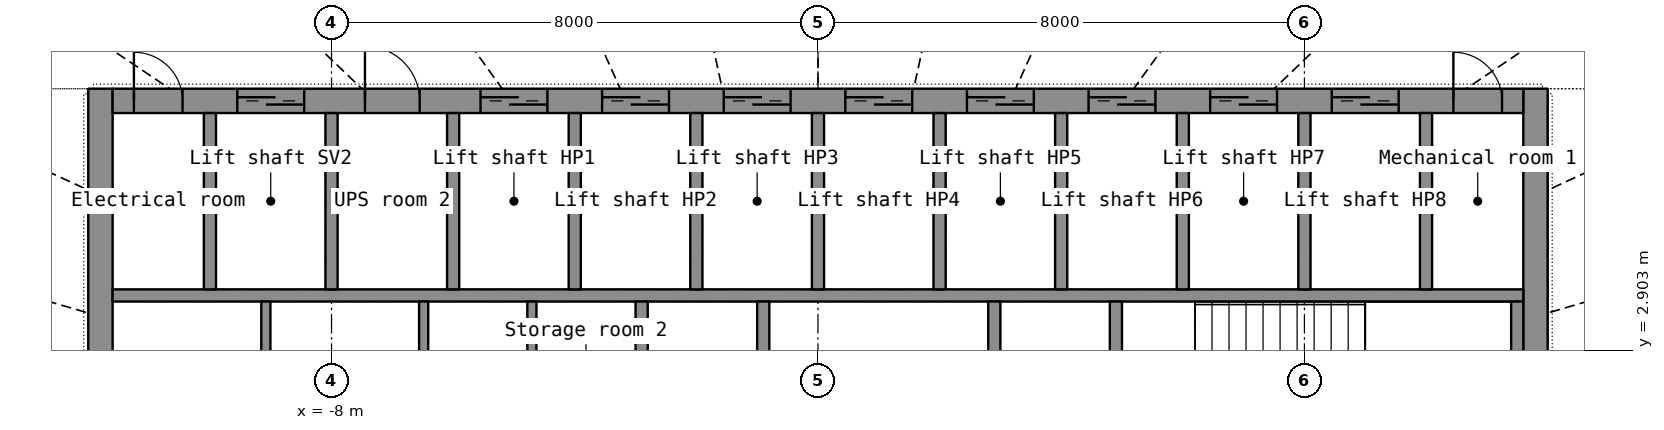
"""IFC4 building model, lengths in metres.
Left out: names, types, materials, properties, quantities, classifications, styles, units other than length and angle.
Written with IfcOpenShell. Run it as: python <this file> out.ifc"""

import sys

from ifc_helpers import new_model, si_unit, direction, frame, frame_2d, origin, place, context, subcontext, project, spatial, rectangle, extrude, element, fill, save


model = new_model("IFC4")
c1 = context("Model", 3, precision=1e-05, world=origin(), true_north=direction((0.0, 1.0)))
c2 = subcontext(c1, "Body", "Model", "MODEL_VIEW")
j1 = project(units=[si_unit("LENGTHUNIT", "METRE"), si_unit("PLANEANGLEUNIT", "RADIAN")], contexts=[c1])
p1 = place(None, origin())
s1 = spatial("IfcSite", under=j1, at=p1, CompositionType="ELEMENT")
p2 = place(p1, origin())
s2 = spatial("IfcBuilding", under=s1, at=p2, CompositionType="ELEMENT")
p3 = place(p2, frame((0.0, 0.0, 239.3)))
s3 = spatial("IfcBuildingStorey", under=s2, at=p3, CompositionType="ELEMENT", Elevation=239.3)
p4 = place(p3, frame((-11.8, -7.2, 0.0), z_axis=(0.0, 0.0, 1.0), x_axis=(0.0, 1.0, 0.0)))
e1 = element("IfcWall", 1, at=p4, inside=s3, PredefinedType="SHEAR", context=c2, shape_type="SweptSolid", body=[
    extrude(rectangle(XDim=14.4, YDim=0.4, at=frame_2d((7.2, 0.0))), origin(), (0.0, 0.0, 1.0), 3.3),
])
p5 = place(p4, frame((6.5, 0.0, 0.0)))
e2 = element("IfcOpeningElement", 2, at=p5, cuts=e1, PredefinedType="OPENING", context=c2, shape_type="SweptSolid", body=[
    extrude(rectangle(XDim=1.4, YDim=2.2, at=frame_2d((0.7, 1.1))), frame((0.0, 0.21, 0.0), z_axis=(0.0, -1.0, 0.0), x_axis=(1.0, 0.0, 0.0)), (0.0, 0.0, 1.0), 0.42),
])
p6 = place(p3, frame((11.8, -7.2, 0.0), z_axis=(0.0, 0.0, 1.0), x_axis=(0.0, 1.0, 0.0)))
e3 = element("IfcWall", 3, at=p6, inside=s3, PredefinedType="SHEAR", context=c2, shape_type="SweptSolid", body=[
    extrude(rectangle(XDim=14.4, YDim=0.4, at=frame_2d((7.2, 0.0))), origin(), (0.0, 0.0, 1.0), 3.3),
])
p7 = place(p6, frame((6.5, 0.0, 0.0)))
e4 = element("IfcOpeningElement", 4, at=p7, cuts=e3, PredefinedType="OPENING", context=c2, shape_type="SweptSolid", body=[
    extrude(rectangle(XDim=1.4, YDim=2.2, at=frame_2d((0.7, 1.1))), frame((0.0, 0.21, 0.0), z_axis=(0.0, -1.0, 0.0), x_axis=(1.0, 0.0, 0.0)), (0.0, 0.0, 1.0), 0.42),
])
p8 = place(p3, frame((-11.6, 7.0, 0.0), z_axis=(0.0, 0.0, 1.0), x_axis=(1.0, 0.0, 0.0)))
e5 = element("IfcWall", 5, at=p8, inside=s3, PredefinedType="SHEAR", context=c2, shape_type="SweptSolid", body=[
    extrude(rectangle(XDim=23.2, YDim=0.4, at=frame_2d((11.6, 0.0))), origin(), (0.0, 0.0, 1.0), 3.3),
])
p9 = place(p8, frame((2.05, 0.0, 0.0)))
e6 = element("IfcOpeningElement", 6, at=p9, cuts=e5, PredefinedType="OPENING", context=c2, shape_type="SweptSolid", body=[
    extrude(rectangle(XDim=1.1, YDim=2.2, at=frame_2d((0.55, 1.1))), frame((0.0, 0.21, 0.0), z_axis=(0.0, -1.0, 0.0), x_axis=(1.0, 0.0, 0.0)), (0.0, 0.0, 1.0), 0.42),
])
p10 = place(p8, frame((6.05, 0.0, 0.0)))
e7 = element("IfcOpeningElement", 7, at=p10, cuts=e5, PredefinedType="OPENING", context=c2, shape_type="SweptSolid", body=[
    extrude(rectangle(XDim=1.1, YDim=2.2, at=frame_2d((0.55, 1.1))), frame((0.0, 0.21, 0.0), z_axis=(0.0, -1.0, 0.0), x_axis=(1.0, 0.0, 0.0)), (0.0, 0.0, 1.0), 0.42),
])
p11 = place(p8, frame((8.05, 0.0, 0.0)))
e8 = element("IfcOpeningElement", 8, at=p11, cuts=e5, PredefinedType="OPENING", context=c2, shape_type="SweptSolid", body=[
    extrude(rectangle(XDim=1.1, YDim=2.2, at=frame_2d((0.55, 1.1))), frame((0.0, 0.21, 0.0), z_axis=(0.0, -1.0, 0.0), x_axis=(1.0, 0.0, 0.0)), (0.0, 0.0, 1.0), 0.42),
])
p12 = place(p8, frame((10.05, 0.0, 0.0)))
e9 = element("IfcOpeningElement", 9, at=p12, cuts=e5, PredefinedType="OPENING", context=c2, shape_type="SweptSolid", body=[
    extrude(rectangle(XDim=1.1, YDim=2.2, at=frame_2d((0.55, 1.1))), frame((0.0, 0.21, 0.0), z_axis=(0.0, -1.0, 0.0), x_axis=(1.0, 0.0, 0.0)), (0.0, 0.0, 1.0), 0.42),
])
p13 = place(p8, frame((12.05, 0.0, 0.0)))
e10 = element("IfcOpeningElement", 10, at=p13, cuts=e5, PredefinedType="OPENING", context=c2, shape_type="SweptSolid", body=[
    extrude(rectangle(XDim=1.1, YDim=2.2, at=frame_2d((0.55, 1.1))), frame((0.0, 0.21, 0.0), z_axis=(0.0, -1.0, 0.0), x_axis=(1.0, 0.0, 0.0)), (0.0, 0.0, 1.0), 0.42),
])
p14 = place(p8, frame((14.05, 0.0, 0.0)))
e11 = element("IfcOpeningElement", 11, at=p14, cuts=e5, PredefinedType="OPENING", context=c2, shape_type="SweptSolid", body=[
    extrude(rectangle(XDim=1.1, YDim=2.2, at=frame_2d((0.55, 1.1))), frame((0.0, 0.21, 0.0), z_axis=(0.0, -1.0, 0.0), x_axis=(1.0, 0.0, 0.0)), (0.0, 0.0, 1.0), 0.42),
])
p15 = place(p8, frame((16.05, 0.0, 0.0)))
e12 = element("IfcOpeningElement", 12, at=p15, cuts=e5, PredefinedType="OPENING", context=c2, shape_type="SweptSolid", body=[
    extrude(rectangle(XDim=1.1, YDim=2.2, at=frame_2d((0.55, 1.1))), frame((0.0, 0.21, 0.0), z_axis=(0.0, -1.0, 0.0), x_axis=(1.0, 0.0, 0.0)), (0.0, 0.0, 1.0), 0.42),
])
p16 = place(p8, frame((18.05, 0.0, 0.0)))
e13 = element("IfcOpeningElement", 13, at=p16, cuts=e5, PredefinedType="OPENING", context=c2, shape_type="SweptSolid", body=[
    extrude(rectangle(XDim=1.1, YDim=2.2, at=frame_2d((0.55, 1.1))), frame((0.0, 0.21, 0.0), z_axis=(0.0, -1.0, 0.0), x_axis=(1.0, 0.0, 0.0)), (0.0, 0.0, 1.0), 0.42),
])
p17 = place(p8, frame((20.05, 0.0, 0.0)))
e14 = element("IfcOpeningElement", 14, at=p17, cuts=e5, PredefinedType="OPENING", context=c2, shape_type="SweptSolid", body=[
    extrude(rectangle(XDim=1.1, YDim=2.2, at=frame_2d((0.55, 1.1))), frame((0.0, 0.21, 0.0), z_axis=(0.0, -1.0, 0.0), x_axis=(1.0, 0.0, 0.0)), (0.0, 0.0, 1.0), 0.42),
])
p18 = place(p8, frame((4.15, 0.0, 0.0)))
e15 = element("IfcOpeningElement", 15, at=p18, cuts=e5, PredefinedType="OPENING", context=c2, shape_type="SweptSolid", body=[
    extrude(rectangle(XDim=0.9, YDim=2.1, at=frame_2d((0.45, 1.05))), frame((0.0, 0.21, 0.0), z_axis=(0.0, -1.0, 0.0), x_axis=(1.0, 0.0, 0.0)), (0.0, 0.0, 1.0), 0.42),
])
p19 = place(p8, frame((0.35, 0.0, 0.0)))
e16 = element("IfcOpeningElement", 16, at=p19, cuts=e5, PredefinedType="OPENING", context=c2, shape_type="SweptSolid", body=[
    extrude(rectangle(XDim=0.8, YDim=2.05, at=frame_2d((0.4, 1.025))), frame((0.0, 0.21, 0.0), z_axis=(0.0, -1.0, 0.0), x_axis=(1.0, 0.0, 0.0)), (0.0, 0.0, 1.0), 0.42),
])
p20 = place(p8, frame((22.05, 0.0, 0.0)))
e17 = element("IfcOpeningElement", 17, at=p20, cuts=e5, PredefinedType="OPENING", context=c2, shape_type="SweptSolid", body=[
    extrude(rectangle(XDim=0.8, YDim=2.05, at=frame_2d((0.4, 1.025))), frame((0.0, 0.21, 0.0), z_axis=(0.0, -1.0, 0.0), x_axis=(1.0, 0.0, 0.0)), (0.0, 0.0, 1.0), 0.42),
])
p21 = place(p3, frame((-11.6, 3.8, 0.0), z_axis=(0.0, 0.0, 1.0), x_axis=(1.0, 0.0, 0.0)))
e18 = element("IfcWall", 18, at=p21, inside=s3, PredefinedType="SHEAR", context=c2, shape_type="SweptSolid", body=[
    extrude(rectangle(XDim=23.2, YDim=0.2, at=frame_2d((11.6, 0.0))), origin(), (0.0, 0.0, 1.0), 3.3),
])
for number, where, z_axis, x_axis in (
    (19, (-10.0, 3.9, 0.0), (0.0, 0.0, 1.0), (0.0, 1.0, 0.0)),
    (20, (-8.0, 3.9, 0.0), (0.0, 0.0, 1.0), (0.0, 1.0, 0.0)),
    (21, (-6.0, 3.9, 0.0), (0.0, 0.0, 1.0), (0.0, 1.0, 0.0)),
    (22, (-4.0, 3.9, 0.0), (0.0, 0.0, 1.0), (0.0, 1.0, 0.0)),
    (23, (-2.0, 3.9, 0.0), (0.0, 0.0, 1.0), (0.0, 1.0, 0.0)),
    (24, (0.0, 3.9, 0.0), (0.0, 0.0, 1.0), (0.0, 1.0, 0.0)),
    (25, (2.0, 3.9, 0.0), (0.0, 0.0, 1.0), (0.0, 1.0, 0.0)),
    (26, (4.0, 3.9, 0.0), (0.0, 0.0, 1.0), (0.0, 1.0, 0.0)),
    (27, (6.0, 3.9, 0.0), (0.0, 0.0, 1.0), (0.0, 1.0, 0.0)),
    (28, (8.0, 3.9, 0.0), (0.0, 0.0, 1.0), (0.0, 1.0, 0.0)),
    (29, (10.0, 3.9, 0.0), (0.0, 0.0, 1.0), (0.0, 1.0, 0.0)),
):
    element("IfcWall", number, at=place(p3, frame(where, z_axis=z_axis, x_axis=x_axis)), inside=s3, PredefinedType="SHEAR", context=c2, shape_type="SweptSolid", body=[
        extrude(rectangle(XDim=2.9, YDim=0.2, at=frame_2d((1.45, 0.0))), origin(), (0.0, 0.0, 1.0), 3.3),
    ])
p22 = place(p3, frame((-2.9, -3.7, 0.0), z_axis=(0.0, 0.0, 1.0), x_axis=(0.0, 1.0, 0.0)))
e30 = element("IfcWall", 30, at=p22, inside=s3, PredefinedType="SHEAR", context=c2, shape_type="SweptSolid", body=[
    extrude(rectangle(XDim=7.4, YDim=0.2, at=frame_2d((3.7, 0.0))), origin(), (0.0, 0.0, 1.0), 3.3),
])
p23 = place(p22, frame((3.1, 0.0, 0.0)))
e31 = element("IfcOpeningElement", 31, at=p23, cuts=e30, PredefinedType="OPENING", context=c2, shape_type="SweptSolid", body=[
    extrude(rectangle(XDim=1.2, YDim=2.2, at=frame_2d((0.6, 1.1))), frame((0.0, 0.11, 0.0), z_axis=(0.0, -1.0, 0.0), x_axis=(1.0, 0.0, 0.0)), (0.0, 0.0, 1.0), 0.22),
])
p24 = place(p3, frame((2.9, -3.7, 0.0), z_axis=(0.0, 0.0, 1.0), x_axis=(0.0, 1.0, 0.0)))
e32 = element("IfcWall", 32, at=p24, inside=s3, PredefinedType="SHEAR", context=c2, shape_type="SweptSolid", body=[
    extrude(rectangle(XDim=7.4, YDim=0.2, at=frame_2d((3.7, 0.0))), origin(), (0.0, 0.0, 1.0), 3.3),
])
p25 = place(p24, frame((3.1, 0.0, 0.0)))
e33 = element("IfcOpeningElement", 33, at=p25, cuts=e32, PredefinedType="OPENING", context=c2, shape_type="SweptSolid", body=[
    extrude(rectangle(XDim=1.2, YDim=2.2, at=frame_2d((0.6, 1.1))), frame((0.0, 0.11, 0.0), z_axis=(0.0, -1.0, 0.0), x_axis=(1.0, 0.0, 0.0)), (0.0, 0.0, 1.0), 0.22),
])
for number, where, z_axis, x_axis in (
    (34, (-0.9, 1.35, 0.0), (0.0, 0.0, 1.0), (0.0, 1.0, 0.0)),
    (35, (11.5, 1.35, 0.0), (0.0, 0.0, 1.0), (0.0, 1.0, 0.0)),
    (36, (4.9, 1.35, 0.0), (0.0, 0.0, 1.0), (0.0, 1.0, 0.0)),
):
    element("IfcWall", number, at=place(p3, frame(where, z_axis=z_axis, x_axis=x_axis)), inside=s3, PredefinedType="SHEAR", context=c2, shape_type="SweptSolid", body=[
        extrude(rectangle(XDim=2.35, YDim=0.2, at=frame_2d((1.175, 0.0))), origin(), (0.0, 0.0, 1.0), 3.3),
    ])
for number, where, z_axis, x_axis in (
    (37, (-9.08, 1.35, 0.0), (0.0, 0.0, 1.0), (0.0, 1.0, 0.0)),
    (38, (-6.485, 1.35, 0.0), (0.0, 0.0, 1.0), (0.0, 1.0, 0.0)),
    (39, (-4.705, 1.35, 0.0), (0.0, 0.0, 1.0), (0.0, 1.0, 0.0)),
):
    element("IfcWall", number, at=place(p3, frame(where, z_axis=z_axis, x_axis=x_axis)), inside=s3, PredefinedType="PARTITIONING", context=c2, shape_type="SweptSolid", body=[
        extrude(rectangle(XDim=2.35, YDim=0.15, at=frame_2d((1.175, 0.0))), origin(), (0.0, 0.0, 1.0), 3.3),
    ])
p26 = place(p9, origin())
e40 = element("IfcDoor", 40, at=p26, inside=s3, OperationType="DOUBLE_DOOR_SLIDING", PredefinedType="DOOR", context=c2, shape_type="SweptSolid", body=[
    extrude(rectangle(XDim=1.1, YDim=2.2, at=frame_2d((0.55, 1.1))), frame((0.0, 0.025, 0.0), z_axis=(0.0, -1.0, 0.0), x_axis=(1.0, 0.0, 0.0)), (0.0, 0.0, 1.0), 0.05),
])
fill(e6, e40)
p27 = place(p10, origin())
e41 = element("IfcDoor", 41, at=p27, inside=s3, OperationType="DOUBLE_DOOR_SLIDING", PredefinedType="DOOR", context=c2, shape_type="SweptSolid", body=[
    extrude(rectangle(XDim=1.1, YDim=2.2, at=frame_2d((0.55, 1.1))), frame((0.0, 0.025, 0.0), z_axis=(0.0, -1.0, 0.0), x_axis=(1.0, 0.0, 0.0)), (0.0, 0.0, 1.0), 0.05),
])
fill(e7, e41)
p28 = place(p11, origin())
e42 = element("IfcDoor", 42, at=p28, inside=s3, OperationType="DOUBLE_DOOR_SLIDING", PredefinedType="DOOR", context=c2, shape_type="SweptSolid", body=[
    extrude(rectangle(XDim=1.1, YDim=2.2, at=frame_2d((0.55, 1.1))), frame((0.0, 0.025, 0.0), z_axis=(0.0, -1.0, 0.0), x_axis=(1.0, 0.0, 0.0)), (0.0, 0.0, 1.0), 0.05),
])
fill(e8, e42)
p29 = place(p12, origin())
e43 = element("IfcDoor", 43, at=p29, inside=s3, OperationType="DOUBLE_DOOR_SLIDING", PredefinedType="DOOR", context=c2, shape_type="SweptSolid", body=[
    extrude(rectangle(XDim=1.1, YDim=2.2, at=frame_2d((0.55, 1.1))), frame((0.0, 0.025, 0.0), z_axis=(0.0, -1.0, 0.0), x_axis=(1.0, 0.0, 0.0)), (0.0, 0.0, 1.0), 0.05),
])
fill(e9, e43)
p30 = place(p13, origin())
e44 = element("IfcDoor", 44, at=p30, inside=s3, OperationType="DOUBLE_DOOR_SLIDING", PredefinedType="DOOR", context=c2, shape_type="SweptSolid", body=[
    extrude(rectangle(XDim=1.1, YDim=2.2, at=frame_2d((0.55, 1.1))), frame((0.0, 0.025, 0.0), z_axis=(0.0, -1.0, 0.0), x_axis=(1.0, 0.0, 0.0)), (0.0, 0.0, 1.0), 0.05),
])
fill(e10, e44)
p31 = place(p14, origin())
e45 = element("IfcDoor", 45, at=p31, inside=s3, OperationType="DOUBLE_DOOR_SLIDING", PredefinedType="DOOR", context=c2, shape_type="SweptSolid", body=[
    extrude(rectangle(XDim=1.1, YDim=2.2, at=frame_2d((0.55, 1.1))), frame((0.0, 0.025, 0.0), z_axis=(0.0, -1.0, 0.0), x_axis=(1.0, 0.0, 0.0)), (0.0, 0.0, 1.0), 0.05),
])
fill(e11, e45)
p32 = place(p15, origin())
e46 = element("IfcDoor", 46, at=p32, inside=s3, OperationType="DOUBLE_DOOR_SLIDING", PredefinedType="DOOR", context=c2, shape_type="SweptSolid", body=[
    extrude(rectangle(XDim=1.1, YDim=2.2, at=frame_2d((0.55, 1.1))), frame((0.0, 0.025, 0.0), z_axis=(0.0, -1.0, 0.0), x_axis=(1.0, 0.0, 0.0)), (0.0, 0.0, 1.0), 0.05),
])
fill(e12, e46)
p33 = place(p16, origin())
e47 = element("IfcDoor", 47, at=p33, inside=s3, OperationType="DOUBLE_DOOR_SLIDING", PredefinedType="DOOR", context=c2, shape_type="SweptSolid", body=[
    extrude(rectangle(XDim=1.1, YDim=2.2, at=frame_2d((0.55, 1.1))), frame((0.0, 0.025, 0.0), z_axis=(0.0, -1.0, 0.0), x_axis=(1.0, 0.0, 0.0)), (0.0, 0.0, 1.0), 0.05),
])
fill(e13, e47)
p34 = place(p17, origin())
e48 = element("IfcDoor", 48, at=p34, inside=s3, OperationType="DOUBLE_DOOR_SLIDING", PredefinedType="DOOR", context=c2, shape_type="SweptSolid", body=[
    extrude(rectangle(XDim=1.1, YDim=2.2, at=frame_2d((0.55, 1.1))), frame((0.0, 0.025, 0.0), z_axis=(0.0, -1.0, 0.0), x_axis=(1.0, 0.0, 0.0)), (0.0, 0.0, 1.0), 0.05),
])
fill(e14, e48)
p35 = place(p18, origin())
e49 = element("IfcDoor", 49, at=p35, inside=s3, OperationType="SINGLE_SWING_LEFT", PredefinedType="DOOR", context=c2, shape_type="SweptSolid", body=[
    extrude(rectangle(XDim=0.9, YDim=2.1, at=frame_2d((0.45, 1.05))), frame((0.0, 0.025, 0.0), z_axis=(0.0, -1.0, 0.0), x_axis=(1.0, 0.0, 0.0)), (0.0, 0.0, 1.0), 0.05),
])
fill(e15, e49)
p36 = place(p19, origin())
e50 = element("IfcDoor", 50, at=p36, inside=s3, OperationType="SINGLE_SWING_LEFT", PredefinedType="DOOR", context=c2, shape_type="SweptSolid", body=[
    extrude(rectangle(XDim=0.8, YDim=2.05, at=frame_2d((0.4, 1.025))), frame((0.0, 0.025, 0.0), z_axis=(0.0, -1.0, 0.0), x_axis=(1.0, 0.0, 0.0)), (0.0, 0.0, 1.0), 0.05),
])
fill(e16, e50)
p37 = place(p20, origin())
e51 = element("IfcDoor", 51, at=p37, inside=s3, OperationType="SINGLE_SWING_LEFT", PredefinedType="DOOR", context=c2, shape_type="SweptSolid", body=[
    extrude(rectangle(XDim=0.8, YDim=2.05, at=frame_2d((0.4, 1.025))), frame((0.0, 0.025, 0.0), z_axis=(0.0, -1.0, 0.0), x_axis=(1.0, 0.0, 0.0)), (0.0, 0.0, 1.0), 0.05),
])
fill(e17, e51)
save(model, sys.argv[1])
